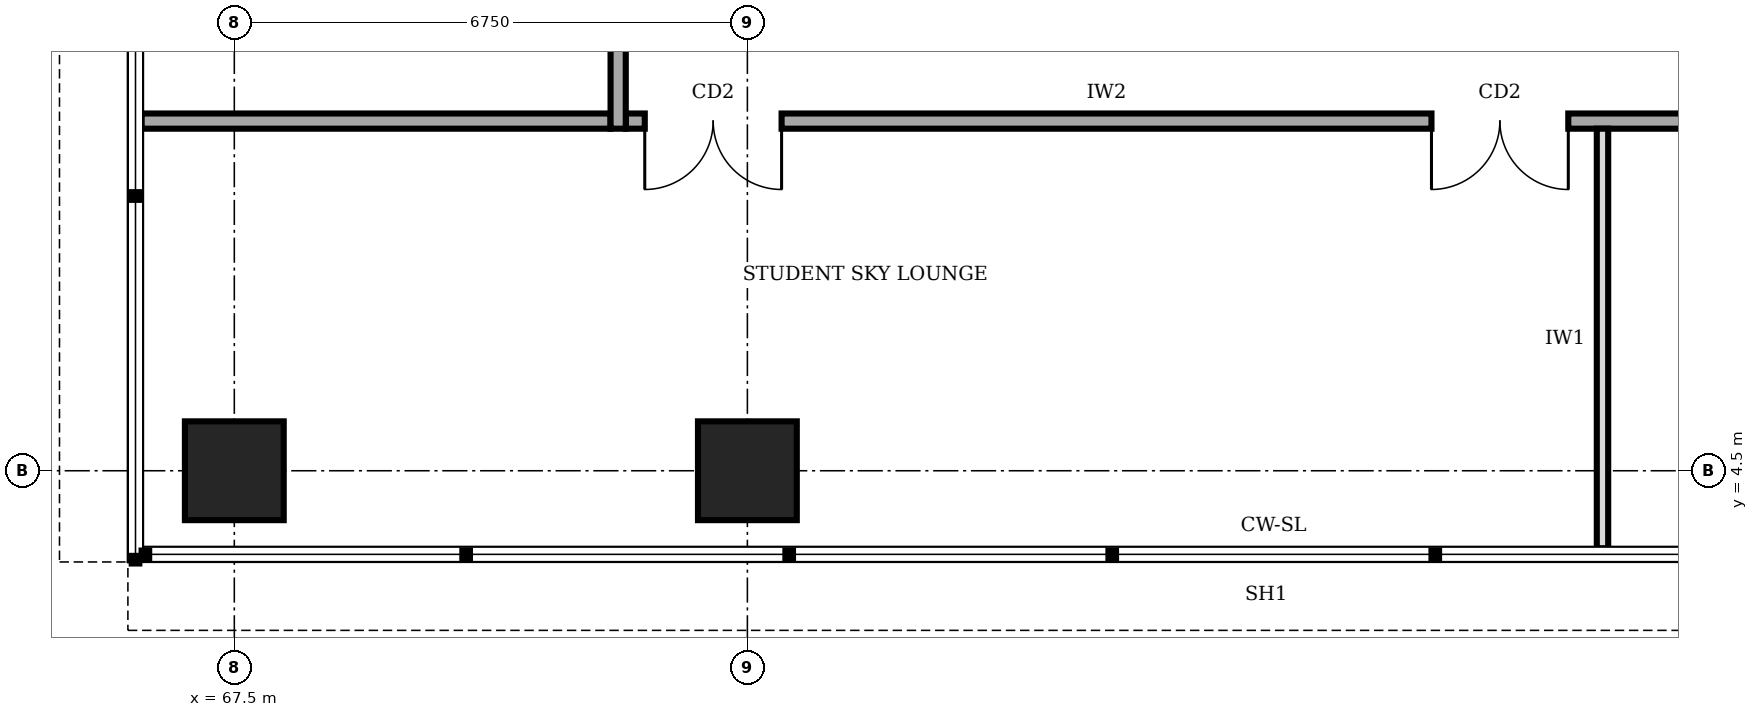
"""IFC4 building model, lengths in metres.
Left out: names, types, materials, properties, quantities, classifications, styles, units other than length and angle.
Written with IfcOpenShell. Run it as: python <this file> out.ifc"""

import sys

from ifc_helpers import new_model, si_unit, direction, frame, frame_2d, origin, origin_2d, place, context, subcontext, project, spatial, rectangle, extrude, element, fill, save


model = new_model("IFC4")
c1 = context("Model", 3, precision=1e-05, world=origin(), true_north=direction((0.0, 1.0)))
c2 = subcontext(c1, "Body", "Model", "MODEL_VIEW")
j1 = project(units=[si_unit("LENGTHUNIT", "METRE"), si_unit("PLANEANGLEUNIT", "RADIAN")], contexts=[c1])
p1 = place(None, origin())
s1 = spatial("IfcSite", under=j1, at=p1, CompositionType="ELEMENT")
p2 = place(p1, origin())
s2 = spatial("IfcBuilding", under=s1, at=p2, CompositionType="ELEMENT")
p3 = place(p2, frame((0.0, 0.0, 233.0)))
s3 = spatial("IfcBuildingStorey", under=s2, at=p3, CompositionType="ELEMENT", Elevation=233.0)
for number, where, z_axis, x_axis in (
    (1, (67.5, 4.5, 0.0), (0.0, 0.0, 1.0), (1.0, 0.0, 0.0)),
    (2, (74.25, 4.5, 0.0), (0.0, 0.0, 1.0), (1.0, 0.0, 0.0)),
):
    element("IfcColumn", number, at=place(p3, frame(where, z_axis=z_axis, x_axis=x_axis)), inside=s3, PredefinedType="COLUMN", context=c2, shape_type="SweptSolid", body=[
        extrude(rectangle(XDim=1.3, YDim=1.3, at=origin_2d()), origin(), (0.0, 0.0, 1.0), 4.0),
    ])
p4 = place(p3, frame((72.65, 9.1, 0.0), z_axis=(0.0, 0.0, 1.0), x_axis=(1.0, 0.0, 0.0)))
e3 = element("IfcWall", 3, at=p4, inside=s3, PredefinedType="SOLIDWALL", context=c2, shape_type="SweptSolid", body=[
    extrude(rectangle(XDim=16.9, YDim=0.2, at=frame_2d((8.45, 0.0))), origin(), (0.0, 0.0, 1.0), 3.75),
])
p5 = place(p4, frame((0.25, 0.0, 0.0)))
e4 = element("IfcOpeningElement", 4, at=p5, cuts=e3, PredefinedType="OPENING", context=c2, shape_type="SweptSolid", body=[
    extrude(rectangle(XDim=1.8, YDim=2.1, at=frame_2d((0.9, 1.05))), frame((0.0, 0.11, 0.0), z_axis=(0.0, -1.0, 0.0), x_axis=(1.0, 0.0, 0.0)), (0.0, 0.0, 1.0), 0.22),
])
p6 = place(p4, frame((10.6, 0.0, 0.0)))
e5 = element("IfcOpeningElement", 5, at=p6, cuts=e3, PredefinedType="OPENING", context=c2, shape_type="SweptSolid", body=[
    extrude(rectangle(XDim=1.8, YDim=2.1, at=frame_2d((0.9, 1.05))), frame((0.0, 0.11, 0.0), z_axis=(0.0, -1.0, 0.0), x_axis=(1.0, 0.0, 0.0)), (0.0, 0.0, 1.0), 0.22),
])
p7 = place(p4, frame((14.375, 0.0, 0.0)))
e6 = element("IfcOpeningElement", 6, at=p7, cuts=e3, PredefinedType="OPENING", context=c2, shape_type="SweptSolid", body=[
    extrude(rectangle(XDim=1.0, YDim=2.1, at=frame_2d((0.5, 1.05))), frame((0.0, 0.11, 0.0), z_axis=(0.0, -1.0, 0.0), x_axis=(1.0, 0.0, 0.0)), (0.0, 0.0, 1.0), 0.22),
])
p8 = place(p3, frame((72.55, 31.3, 0.0), z_axis=(0.0, 0.0, 1.0), x_axis=(0.0, -1.0, 0.0)))
e7 = element("IfcWall", 7, at=p8, inside=s3, PredefinedType="SOLIDWALL", context=c2, shape_type="SweptSolid", body=[
    extrude(rectangle(XDim=22.3, YDim=0.2, at=frame_2d((11.15, 0.0))), origin(), (0.0, 0.0, 1.0), 3.75),
])
p9 = place(p8, frame((19.55, 0.0, 0.0)))
e8 = element("IfcOpeningElement", 8, at=p9, cuts=e7, PredefinedType="OPENING", context=c2, shape_type="SweptSolid", body=[
    extrude(rectangle(XDim=1.0, YDim=2.1, at=frame_2d((0.5, 1.05))), frame((0.0, 0.11, 0.0), z_axis=(0.0, -1.0, 0.0), x_axis=(1.0, 0.0, 0.0)), (0.0, 0.0, 1.0), 0.22),
])
p10 = place(p8, frame((15.05, 0.0, 0.0)))
e9 = element("IfcOpeningElement", 9, at=p10, cuts=e7, PredefinedType="OPENING", context=c2, shape_type="SweptSolid", body=[
    extrude(rectangle(XDim=1.0, YDim=2.1, at=frame_2d((0.5, 1.05))), frame((0.0, 0.11, 0.0), z_axis=(0.0, -1.0, 0.0), x_axis=(1.0, 0.0, 0.0)), (0.0, 0.0, 1.0), 0.22),
])
p11 = place(p8, frame((10.55, 0.0, 0.0)))
e10 = element("IfcOpeningElement", 10, at=p11, cuts=e7, PredefinedType="OPENING", context=c2, shape_type="SweptSolid", body=[
    extrude(rectangle(XDim=1.0, YDim=2.1, at=frame_2d((0.5, 1.05))), frame((0.0, 0.11, 0.0), z_axis=(0.0, -1.0, 0.0), x_axis=(1.0, 0.0, 0.0)), (0.0, 0.0, 1.0), 0.22),
])
p12 = place(p8, frame((6.05, 0.0, 0.0)))
e11 = element("IfcOpeningElement", 11, at=p12, cuts=e7, PredefinedType="OPENING", context=c2, shape_type="SweptSolid", body=[
    extrude(rectangle(XDim=1.0, YDim=2.1, at=frame_2d((0.5, 1.05))), frame((0.0, 0.11, 0.0), z_axis=(0.0, -1.0, 0.0), x_axis=(1.0, 0.0, 0.0)), (0.0, 0.0, 1.0), 0.22),
])
p13 = place(p8, frame((1.55, 0.0, 0.0)))
e12 = element("IfcOpeningElement", 12, at=p13, cuts=e7, PredefinedType="OPENING", context=c2, shape_type="SweptSolid", body=[
    extrude(rectangle(XDim=1.0, YDim=2.1, at=frame_2d((0.5, 1.05))), frame((0.0, 0.11, 0.0), z_axis=(0.0, -1.0, 0.0), x_axis=(1.0, 0.0, 0.0)), (0.0, 0.0, 1.0), 0.22),
])
p14 = place(p3, frame((66.28, 9.1, 0.0), z_axis=(0.0, 0.0, 1.0), x_axis=(1.0, 0.0, 0.0)))
e13 = element("IfcWall", 13, at=p14, inside=s3, PredefinedType="SOLIDWALL", context=c2, shape_type="SweptSolid", body=[
    extrude(rectangle(XDim=6.17, YDim=0.2, at=frame_2d((3.085, 0.0))), origin(), (0.0, 0.0, 1.0), 3.75),
])
p15 = place(p3, frame((85.5, 3.48, 0.0), z_axis=(0.0, 0.0, 1.0), x_axis=(0.0, 1.0, 0.0)))
e14 = element("IfcWall", 14, at=p15, inside=s3, PredefinedType="PARTITIONING", context=c2, shape_type="SweptSolid", body=[
    extrude(rectangle(XDim=5.52, YDim=0.15, at=frame_2d((2.76, 0.0))), origin(), (0.0, 0.0, 1.0), 3.75),
])
p16 = place(p5, frame((1.8, 0.0, 0.0), z_axis=(0.0, 0.0, 1.0), x_axis=(-1.0, 0.0, 0.0)))
e15 = element("IfcDoor", 15, at=p16, inside=s3, OperationType="DOUBLE_DOOR_SINGLE_SWING", PredefinedType="DOOR", context=c2, shape_type="SweptSolid", body=[
    extrude(rectangle(XDim=1.8, YDim=2.1, at=frame_2d((0.9, 1.05))), frame((0.0, 0.025, 0.0), z_axis=(0.0, -1.0, 0.0), x_axis=(1.0, 0.0, 0.0)), (0.0, 0.0, 1.0), 0.05),
])
fill(e4, e15)
p17 = place(p6, frame((1.8, 0.0, 0.0), z_axis=(0.0, 0.0, 1.0), x_axis=(-1.0, 0.0, 0.0)))
e16 = element("IfcDoor", 16, at=p17, inside=s3, OperationType="DOUBLE_DOOR_SINGLE_SWING", PredefinedType="DOOR", context=c2, shape_type="SweptSolid", body=[
    extrude(rectangle(XDim=1.8, YDim=2.1, at=frame_2d((0.9, 1.05))), frame((0.0, 0.025, 0.0), z_axis=(0.0, -1.0, 0.0), x_axis=(1.0, 0.0, 0.0)), (0.0, 0.0, 1.0), 0.05),
])
fill(e5, e16)
save(model, sys.argv[1])
